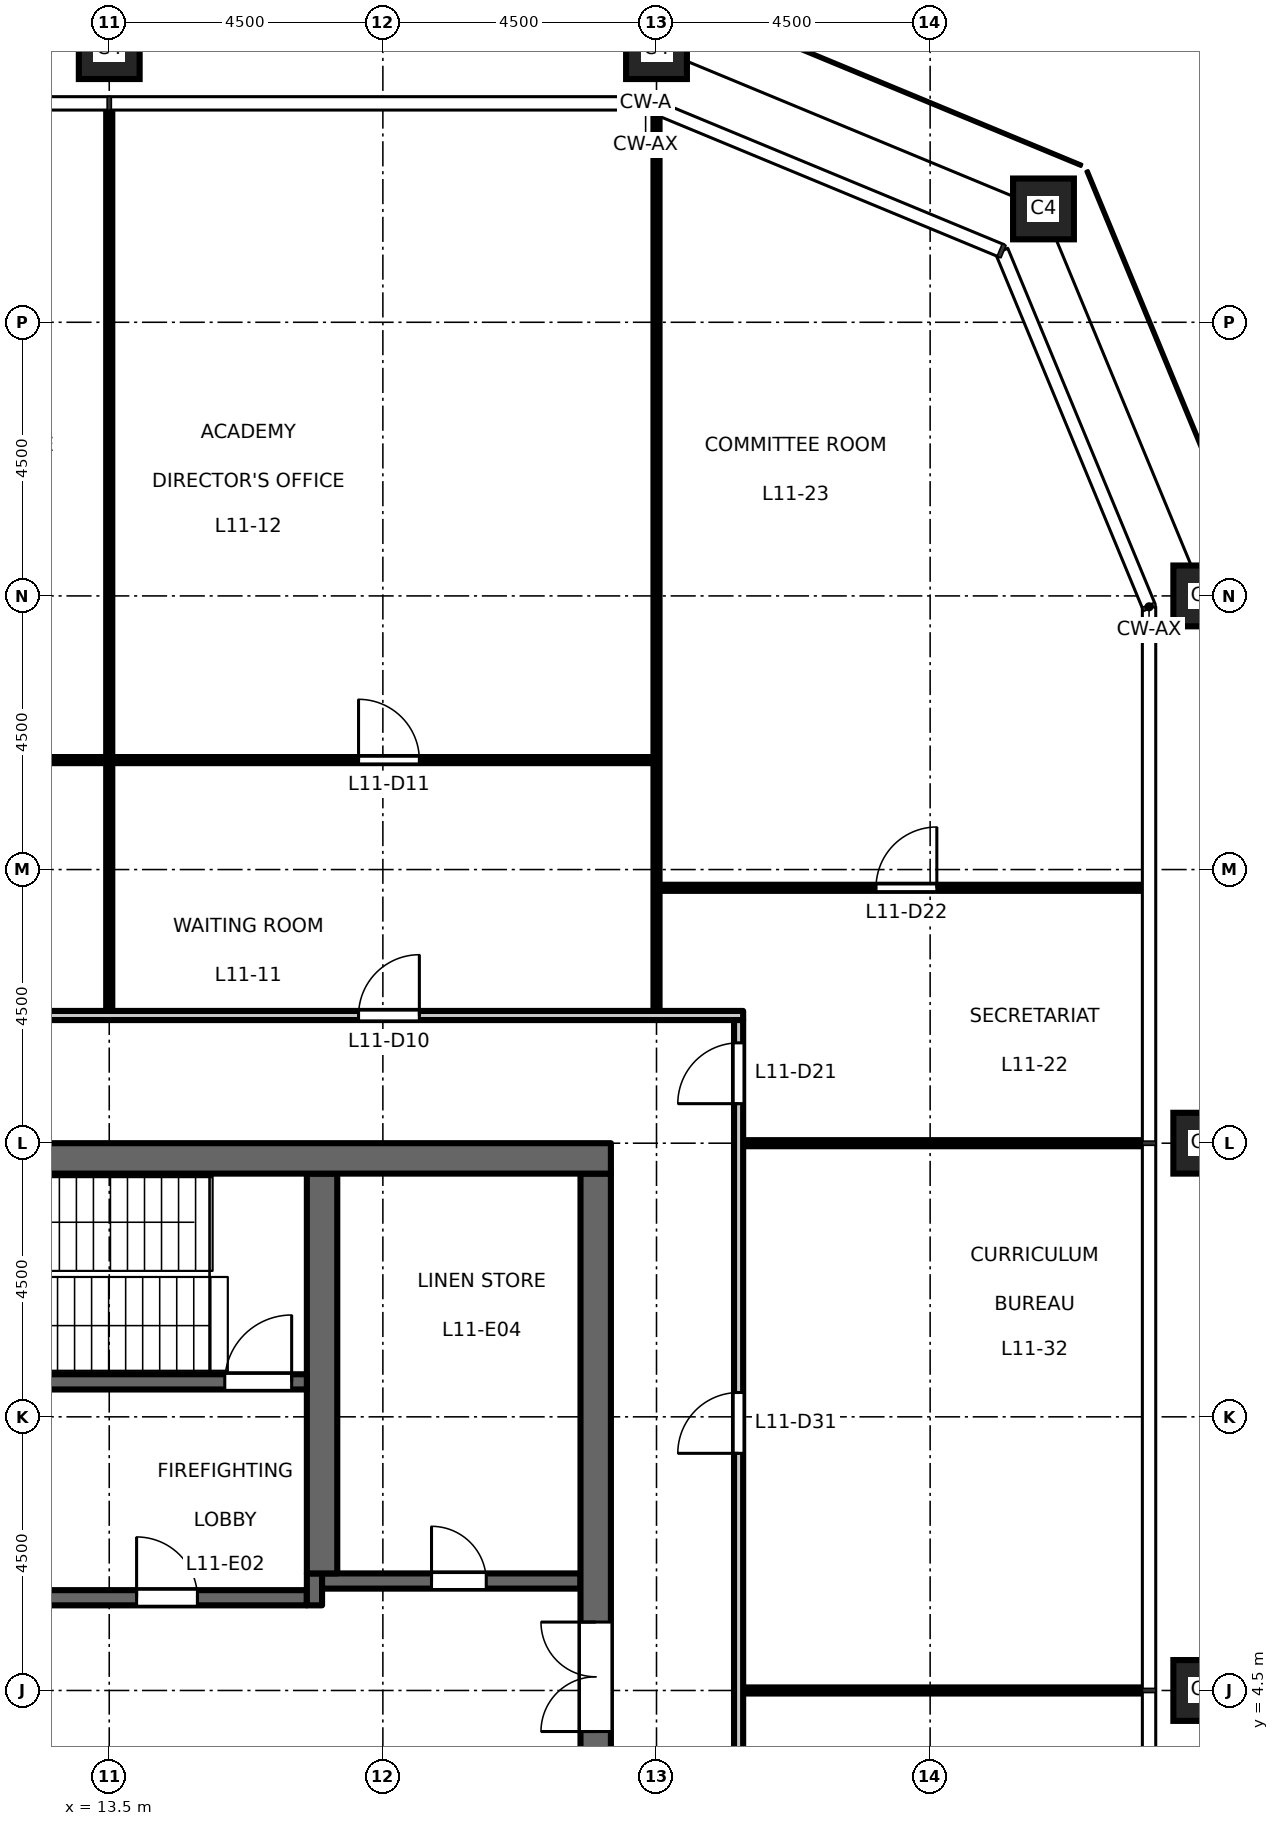
"""IFC4 building model, lengths in metres.
Left out: names, types, materials, properties, quantities, classifications, styles, units other than length and angle.
Written with IfcOpenShell. Run it as: python <this file> out.ifc"""

import sys

from ifc_helpers import new_model, si_unit, direction, frame, frame_2d, origin, origin_2d, place, context, subcontext, project, spatial, rectangle, hollow_rectangle, extrude, element, fill, save


model = new_model("IFC4")
c1 = context("Model", 3, precision=1e-05, world=origin(), true_north=direction((0.0, 1.0)))
c2 = subcontext(c1, "Body", "Model", "MODEL_VIEW")
j1 = project(units=[si_unit("LENGTHUNIT", "METRE"), si_unit("PLANEANGLEUNIT", "RADIAN")], contexts=[c1])
p1 = place(None, origin())
s1 = spatial("IfcSite", under=j1, at=p1, CompositionType="ELEMENT")
p2 = place(p1, origin())
s2 = spatial("IfcBuilding", under=s1, at=p2, CompositionType="ELEMENT")
p3 = place(p2, frame((0.0, 0.0, 53.7)))
s3 = spatial("IfcBuildingStorey", under=s2, at=p3, CompositionType="ELEMENT", Elevation=53.7)
for number, where, z_axis, x_axis in (
    (1, (31.5, 4.5, 0.0), (0.0, 0.0, 1.0), (1.0, 0.0, 0.0)),
    (2, (31.5, 13.5, 0.0), (0.0, 0.0, 1.0), (1.0, 0.0, 0.0)),
    (3, (31.5, 22.5, 0.0), (0.0, 0.0, 1.0), (1.0, 0.0, 0.0)),
    (4, (28.864, 28.864, 0.0), (0.0, 0.0, 1.0), (1.0, 0.0, 0.0)),
    (5, (22.5, 31.5, 0.0), (0.0, 0.0, 1.0), (1.0, 0.0, 0.0)),
    (6, (13.5, 31.5, 0.0), (0.0, 0.0, 1.0), (1.0, 0.0, 0.0)),
):
    element("IfcColumn", number, at=place(p3, frame(where, z_axis=z_axis, x_axis=x_axis)), inside=s3, PredefinedType="COLUMN", context=c2, shape_type="SweptSolid", body=[
        extrude(hollow_rectangle(XDim=1.0, YDim=1.0, WallThickness=0.06, at=origin_2d()), origin(), (0.0, 0.0, 1.0), 4.5),
    ])
p4 = place(p3, frame((12.15, 6.025, 0.0), z_axis=(0.0, 0.0, 1.0), x_axis=(1.0, 0.0, 0.0)))
e7 = element("IfcWall", 7, at=p4, inside=s3, PredefinedType="SHEAR", context=c2, shape_type="SweptSolid", body=[
    extrude(rectangle(XDim=4.6, YDim=0.25, at=frame_2d((2.3, 0.0))), origin(), (0.0, 0.0, 1.0), 4.35),
])
p5 = place(p4, frame((1.8, 0.0, 0.0)))
e8 = element("IfcOpeningElement", 8, at=p5, cuts=e7, PredefinedType="OPENING", context=c2, shape_type="SweptSolid", body=[
    extrude(rectangle(XDim=1.0, YDim=2.1, at=frame_2d((0.5, 1.05))), frame((0.0, 0.135, 0.0), z_axis=(0.0, -1.0, 0.0), x_axis=(1.0, 0.0, 0.0)), (0.0, 0.0, 1.0), 0.27),
])
p6 = place(p3, frame((16.875, 5.9, 0.0), z_axis=(0.0, 0.0, 1.0), x_axis=(0.0, 1.0, 0.0)))
e9 = element("IfcWall", 9, at=p6, inside=s3, PredefinedType="SHEAR", context=c2, shape_type="SweptSolid", body=[
    extrude(rectangle(XDim=0.525, YDim=0.25, at=frame_2d((0.263, 0.0))), origin(), (0.0, 0.0, 1.0), 4.35),
])
p7 = place(p3, frame((17.0, 6.3, 0.0), z_axis=(0.0, 0.0, 1.0), x_axis=(1.0, 0.0, 0.0)))
e10 = element("IfcWall", 10, at=p7, inside=s3, PredefinedType="SHEAR", context=c2, shape_type="SweptSolid", body=[
    extrude(rectangle(XDim=4.25, YDim=0.25, at=frame_2d((2.125, 0.0))), origin(), (0.0, 0.0, 1.0), 4.35),
])
p8 = place(p7, frame((1.8, 0.0, 0.0)))
e11 = element("IfcOpeningElement", 11, at=p8, cuts=e10, PredefinedType="OPENING", context=c2, shape_type="SweptSolid", body=[
    extrude(rectangle(XDim=0.9, YDim=2.1, at=frame_2d((0.45, 1.05))), frame((0.0, 0.135, 0.0), z_axis=(0.0, -1.0, 0.0), x_axis=(1.0, 0.0, 0.0)), (0.0, 0.0, 1.0), 0.27),
])
p9 = place(p3, frame((21.5, -13.0, 0.0), z_axis=(0.0, 0.0, 1.0), x_axis=(0.0, 1.0, 0.0)))
e12 = element("IfcWall", 12, at=p9, inside=s3, PredefinedType="SHEAR", context=c2, shape_type="SweptSolid", body=[
    extrude(rectangle(XDim=26.0, YDim=0.5, at=frame_2d((13.0, 0.0))), origin(), (0.0, 0.0, 1.0), 4.35),
])
p10 = place(p9, frame((16.825, 0.0, 0.0)))
e13 = element("IfcOpeningElement", 13, at=p10, cuts=e12, PredefinedType="OPENING", context=c2, shape_type="SweptSolid", body=[
    extrude(rectangle(XDim=1.8, YDim=2.1, at=frame_2d((0.9, 1.05))), frame((0.0, 0.26, 0.0), z_axis=(0.0, -1.0, 0.0), x_axis=(1.0, 0.0, 0.0)), (0.0, 0.0, 1.0), 0.52),
])
p11 = place(p9, frame((7.375, 0.0, 0.0)))
e14 = element("IfcOpeningElement", 14, at=p11, cuts=e12, PredefinedType="OPENING", context=c2, shape_type="SweptSolid", body=[
    extrude(rectangle(XDim=1.8, YDim=2.1, at=frame_2d((0.9, 1.05))), frame((0.0, 0.26, 0.0), z_axis=(0.0, -1.0, 0.0), x_axis=(1.0, 0.0, 0.0)), (0.0, 0.0, 1.0), 0.52),
])
p12 = place(p9, frame((2.65, 0.0, 0.0)))
e15 = element("IfcOpeningElement", 15, at=p12, cuts=e12, PredefinedType="OPENING", context=c2, shape_type="SweptSolid", body=[
    extrude(rectangle(XDim=0.9, YDim=2.1, at=frame_2d((0.45, 1.05))), frame((0.0, 0.26, 0.0), z_axis=(0.0, -1.0, 0.0), x_axis=(1.0, 0.0, 0.0)), (0.0, 0.0, 1.0), 0.52),
])
p13 = place(p3, frame((17.0, 6.425, 0.0), z_axis=(0.0, 0.0, 1.0), x_axis=(0.0, 1.0, 0.0)))
e16 = element("IfcWall", 16, at=p13, inside=s3, PredefinedType="SHEAR", context=c2, shape_type="SweptSolid", body=[
    extrude(rectangle(XDim=6.575, YDim=0.5, at=frame_2d((3.288, 0.0))), origin(), (0.0, 0.0, 1.0), 4.35),
])
p14 = place(p3, frame((8.75, 9.575, 0.0), z_axis=(0.0, 0.0, 1.0), x_axis=(1.0, 0.0, 0.0)))
e17 = element("IfcWall", 17, at=p14, inside=s3, PredefinedType="SHEAR", context=c2, shape_type="SweptSolid", body=[
    extrude(rectangle(XDim=8.0, YDim=0.25, at=frame_2d((4.0, 0.0))), origin(), (0.0, 0.0, 1.0), 4.35),
])
p15 = place(p14, frame((6.65, 0.0, 0.0)))
e18 = element("IfcOpeningElement", 18, at=p15, cuts=e17, PredefinedType="OPENING", context=c2, shape_type="SweptSolid", body=[
    extrude(rectangle(XDim=1.1, YDim=2.1, at=frame_2d((0.55, 1.05))), frame((0.0, 0.135, 0.0), z_axis=(0.0, -1.0, 0.0), x_axis=(1.0, 0.0, 0.0)), (0.0, 0.0, 1.0), 0.27),
])
p16 = place(p3, frame((8.25, 13.25, 0.0), z_axis=(0.0, 0.0, 1.0), x_axis=(1.0, 0.0, 0.0)))
e19 = element("IfcWall", 19, at=p16, inside=s3, PredefinedType="SHEAR", context=c2, shape_type="SweptSolid", body=[
    extrude(rectangle(XDim=13.5, YDim=0.5, at=frame_2d((6.75, 0.0))), origin(), (0.0, 0.0, 1.0), 4.35),
])
p17 = place(p3, frame((23.925, 4.5, 0.0), z_axis=(0.0, 0.0, 1.0), x_axis=(1.0, 0.0, 0.0)))
e20 = element("IfcWall", 20, at=p17, inside=s3, PredefinedType="PARTITIONING", context=c2, shape_type="SweptSolid", body=[
    extrude(rectangle(XDim=6.585, YDim=0.1, at=frame_2d((3.292, 0.0))), origin(), (0.0, 0.0, 1.0), 4.35),
])
p18 = place(p3, frame((23.925, 13.5, 0.0), z_axis=(0.0, 0.0, 1.0), x_axis=(1.0, 0.0, 0.0)))
e21 = element("IfcWall", 21, at=p18, inside=s3, PredefinedType="PARTITIONING", context=c2, shape_type="SweptSolid", body=[
    extrude(rectangle(XDim=6.585, YDim=0.1, at=frame_2d((3.292, 0.0))), origin(), (0.0, 0.0, 1.0), 3.35),
])
p19 = place(p3, frame((-23.925, 15.6, 0.0), z_axis=(0.0, 0.0, 1.0), x_axis=(1.0, 0.0, 0.0)))
e22 = element("IfcWall", 22, at=p19, inside=s3, PredefinedType="PARTITIONING", context=c2, shape_type="SweptSolid", body=[
    extrude(rectangle(XDim=47.85, YDim=0.15, at=frame_2d((23.925, 0.0))), origin(), (0.0, 0.0, 1.0), 4.35),
])
p20 = place(p19, frame((5.525, 0.0, 0.0)))
e23 = element("IfcOpeningElement", 23, at=p20, cuts=e22, PredefinedType="OPENING", context=c2, shape_type="SweptSolid", body=[
    extrude(rectangle(XDim=1.0, YDim=2.1, at=frame_2d((0.5, 1.05))), frame((0.0, 0.085, 0.0), z_axis=(0.0, -1.0, 0.0), x_axis=(1.0, 0.0, 0.0)), (0.0, 0.0, 1.0), 0.17),
])
p21 = place(p19, frame((14.525, 0.0, 0.0)))
e24 = element("IfcOpeningElement", 24, at=p21, cuts=e22, PredefinedType="OPENING", context=c2, shape_type="SweptSolid", body=[
    extrude(rectangle(XDim=1.0, YDim=2.1, at=frame_2d((0.5, 1.05))), frame((0.0, 0.085, 0.0), z_axis=(0.0, -1.0, 0.0), x_axis=(1.0, 0.0, 0.0)), (0.0, 0.0, 1.0), 0.17),
])
p22 = place(p19, frame((23.525, 0.0, 0.0)))
e25 = element("IfcOpeningElement", 25, at=p22, cuts=e22, PredefinedType="OPENING", context=c2, shape_type="SweptSolid", body=[
    extrude(rectangle(XDim=1.0, YDim=2.1, at=frame_2d((0.5, 1.05))), frame((0.0, 0.085, 0.0), z_axis=(0.0, -1.0, 0.0), x_axis=(1.0, 0.0, 0.0)), (0.0, 0.0, 1.0), 0.17),
])
p23 = place(p19, frame((32.525, 0.0, 0.0)))
e26 = element("IfcOpeningElement", 26, at=p23, cuts=e22, PredefinedType="OPENING", context=c2, shape_type="SweptSolid", body=[
    extrude(rectangle(XDim=1.0, YDim=2.1, at=frame_2d((0.5, 1.05))), frame((0.0, 0.085, 0.0), z_axis=(0.0, -1.0, 0.0), x_axis=(1.0, 0.0, 0.0)), (0.0, 0.0, 1.0), 0.17),
])
p24 = place(p19, frame((41.525, 0.0, 0.0)))
e27 = element("IfcOpeningElement", 27, at=p24, cuts=e22, PredefinedType="OPENING", context=c2, shape_type="SweptSolid", body=[
    extrude(rectangle(XDim=1.0, YDim=2.1, at=frame_2d((0.5, 1.05))), frame((0.0, 0.085, 0.0), z_axis=(0.0, -1.0, 0.0), x_axis=(1.0, 0.0, 0.0)), (0.0, 0.0, 1.0), 0.17),
])
p25 = place(p3, frame((22.55, 17.7, 0.0), z_axis=(0.0, 0.0, 1.0), x_axis=(1.0, 0.0, 0.0)))
e28 = element("IfcWall", 28, at=p25, inside=s3, PredefinedType="PARTITIONING", context=c2, shape_type="SweptSolid", body=[
    extrude(rectangle(XDim=7.96, YDim=0.1, at=frame_2d((3.98, 0.0))), origin(), (0.0, 0.0, 1.0), 4.35),
])
p26 = place(p25, frame((3.56, 0.0, 0.0)))
e29 = element("IfcOpeningElement", 29, at=p26, cuts=e28, PredefinedType="OPENING", context=c2, shape_type="SweptSolid", body=[
    extrude(rectangle(XDim=1.0, YDim=2.1, at=frame_2d((0.5, 1.05))), frame((0.0, 0.06, 0.0), z_axis=(0.0, -1.0, 0.0), x_axis=(1.0, 0.0, 0.0)), (0.0, 0.0, 1.0), 0.12),
])
p27 = place(p3, frame((-4.45, 19.8, 0.0), z_axis=(0.0, 0.0, 1.0), x_axis=(1.0, 0.0, 0.0)))
e30 = element("IfcWall", 30, at=p27, inside=s3, PredefinedType="PARTITIONING", context=c2, shape_type="SweptSolid", body=[
    extrude(rectangle(XDim=26.9, YDim=0.1, at=frame_2d((13.45, 0.0))), origin(), (0.0, 0.0, 1.0), 4.35),
])
p28 = place(p27, frame((4.05, 0.0, 0.0)))
e31 = element("IfcOpeningElement", 31, at=p28, cuts=e30, PredefinedType="OPENING", context=c2, shape_type="SweptSolid", body=[
    extrude(rectangle(XDim=1.0, YDim=2.1, at=frame_2d((0.5, 1.05))), frame((0.0, 0.06, 0.0), z_axis=(0.0, -1.0, 0.0), x_axis=(1.0, 0.0, 0.0)), (0.0, 0.0, 1.0), 0.12),
])
p29 = place(p27, frame((13.05, 0.0, 0.0)))
e32 = element("IfcOpeningElement", 32, at=p29, cuts=e30, PredefinedType="OPENING", context=c2, shape_type="SweptSolid", body=[
    extrude(rectangle(XDim=1.0, YDim=2.1, at=frame_2d((0.5, 1.05))), frame((0.0, 0.06, 0.0), z_axis=(0.0, -1.0, 0.0), x_axis=(1.0, 0.0, 0.0)), (0.0, 0.0, 1.0), 0.12),
])
p30 = place(p27, frame((22.05, 0.0, 0.0)))
e33 = element("IfcOpeningElement", 33, at=p30, cuts=e30, PredefinedType="OPENING", context=c2, shape_type="SweptSolid", body=[
    extrude(rectangle(XDim=1.0, YDim=2.1, at=frame_2d((0.5, 1.05))), frame((0.0, 0.06, 0.0), z_axis=(0.0, -1.0, 0.0), x_axis=(1.0, 0.0, 0.0)), (0.0, 0.0, 1.0), 0.12),
])
p31 = place(p3, frame((13.5, 15.675, 0.0), z_axis=(0.0, 0.0, 1.0), x_axis=(0.0, 1.0, 0.0)))
e34 = element("IfcWall", 34, at=p31, inside=s3, PredefinedType="PARTITIONING", context=c2, shape_type="SweptSolid", body=[
    extrude(rectangle(XDim=4.075, YDim=0.1, at=frame_2d((2.038, 0.0))), origin(), (0.0, 0.0, 1.0), 3.35),
])
p32 = place(p3, frame((13.5, 19.85, 0.0), z_axis=(0.0, 0.0, 1.0), x_axis=(0.0, 1.0, 0.0)))
e35 = element("IfcWall", 35, at=p32, inside=s3, PredefinedType="PARTITIONING", context=c2, shape_type="SweptSolid", body=[
    extrude(rectangle(XDim=10.66, YDim=0.1, at=frame_2d((5.33, 0.0))), origin(), (0.0, 0.0, 1.0), 3.35),
])
p33 = place(p3, frame((22.5, 15.675, 0.0), z_axis=(0.0, 0.0, 1.0), x_axis=(0.0, 1.0, 0.0)))
e36 = element("IfcWall", 36, at=p33, inside=s3, PredefinedType="PARTITIONING", context=c2, shape_type="SweptSolid", body=[
    extrude(rectangle(XDim=14.753, YDim=0.1, at=frame_2d((7.376, 0.0))), origin(), (0.0, 0.0, 1.0), 3.35),
])
p34 = place(p3, frame((23.85, -15.525, 0.0), z_axis=(0.0, 0.0, 1.0), x_axis=(0.0, 1.0, 0.0)))
e37 = element("IfcWall", 37, at=p34, inside=s3, PredefinedType="PARTITIONING", context=c2, shape_type="SweptSolid", body=[
    extrude(rectangle(XDim=31.05, YDim=0.15, at=frame_2d((15.525, 0.0))), origin(), (0.0, 0.0, 1.0), 4.35),
])
p35 = place(p34, frame((29.675, 0.0, 0.0)))
e38 = element("IfcOpeningElement", 38, at=p35, cuts=e37, PredefinedType="OPENING", context=c2, shape_type="SweptSolid", body=[
    extrude(rectangle(XDim=1.0, YDim=2.1, at=frame_2d((0.5, 1.05))), frame((0.0, 0.085, 0.0), z_axis=(0.0, -1.0, 0.0), x_axis=(1.0, 0.0, 0.0)), (0.0, 0.0, 1.0), 0.17),
])
p36 = place(p34, frame((0.575, 0.0, 0.0)))
e39 = element("IfcOpeningElement", 39, at=p36, cuts=e37, PredefinedType="OPENING", context=c2, shape_type="SweptSolid", body=[
    extrude(rectangle(XDim=1.0, YDim=2.1, at=frame_2d((0.5, 1.05))), frame((0.0, 0.085, 0.0), z_axis=(0.0, -1.0, 0.0), x_axis=(1.0, 0.0, 0.0)), (0.0, 0.0, 1.0), 0.17),
])
p37 = place(p34, frame((5.925, 0.0, 0.0)))
e40 = element("IfcOpeningElement", 40, at=p37, cuts=e37, PredefinedType="OPENING", context=c2, shape_type="SweptSolid", body=[
    extrude(rectangle(XDim=1.0, YDim=2.1, at=frame_2d((0.5, 1.05))), frame((0.0, 0.085, 0.0), z_axis=(0.0, -1.0, 0.0), x_axis=(1.0, 0.0, 0.0)), (0.0, 0.0, 1.0), 0.17),
])
p38 = place(p34, frame((14.925, 0.0, 0.0)))
e41 = element("IfcOpeningElement", 41, at=p38, cuts=e37, PredefinedType="OPENING", context=c2, shape_type="SweptSolid", body=[
    extrude(rectangle(XDim=1.0, YDim=2.1, at=frame_2d((0.5, 1.05))), frame((0.0, 0.085, 0.0), z_axis=(0.0, -1.0, 0.0), x_axis=(1.0, 0.0, 0.0)), (0.0, 0.0, 1.0), 0.17),
])
p39 = place(p34, frame((23.925, 0.0, 0.0)))
e42 = element("IfcOpeningElement", 42, at=p39, cuts=e37, PredefinedType="OPENING", context=c2, shape_type="SweptSolid", body=[
    extrude(rectangle(XDim=1.0, YDim=2.1, at=frame_2d((0.5, 1.05))), frame((0.0, 0.085, 0.0), z_axis=(0.0, -1.0, 0.0), x_axis=(1.0, 0.0, 0.0)), (0.0, 0.0, 1.0), 0.17),
])
p40 = place(p5, origin())
e43 = element("IfcDoor", 43, at=p40, inside=s3, OperationType="SINGLE_SWING_RIGHT", PredefinedType="DOOR", context=c2, shape_type="SweptSolid", body=[
    extrude(rectangle(XDim=1.0, YDim=2.1, at=frame_2d((0.5, 1.05))), frame((0.0, 0.025, 0.0), z_axis=(0.0, -1.0, 0.0), x_axis=(1.0, 0.0, 0.0)), (0.0, 0.0, 1.0), 0.05),
])
fill(e8, e43)
p41 = place(p15, origin())
e44 = element("IfcDoor", 44, at=p41, inside=s3, OperationType="SINGLE_SWING_LEFT", PredefinedType="DOOR", context=c2, shape_type="SweptSolid", body=[
    extrude(rectangle(XDim=1.1, YDim=2.1, at=frame_2d((0.55, 1.05))), frame((0.0, 0.025, 0.0), z_axis=(0.0, -1.0, 0.0), x_axis=(1.0, 0.0, 0.0)), (0.0, 0.0, 1.0), 0.05),
])
fill(e18, e44)
p42 = place(p10, origin())
e45 = element("IfcDoor", 45, at=p42, inside=s3, OperationType="DOUBLE_DOOR_DOUBLE_SWING", PredefinedType="DOOR", context=c2, shape_type="SweptSolid", body=[
    extrude(rectangle(XDim=1.8, YDim=2.1, at=frame_2d((0.9, 1.05))), frame((0.0, 0.025, 0.0), z_axis=(0.0, -1.0, 0.0), x_axis=(1.0, 0.0, 0.0)), (0.0, 0.0, 1.0), 0.05),
])
fill(e13, e45)
p43 = place(p8, origin())
e46 = element("IfcDoor", 46, at=p43, inside=s3, OperationType="SINGLE_SWING_RIGHT", PredefinedType="DOOR", context=c2, shape_type="SweptSolid", body=[
    extrude(rectangle(XDim=0.9, YDim=2.1, at=frame_2d((0.45, 1.05))), frame((0.0, 0.025, 0.0), z_axis=(0.0, -1.0, 0.0), x_axis=(1.0, 0.0, 0.0)), (0.0, 0.0, 1.0), 0.05),
])
fill(e11, e46)
p44 = place(p24, origin())
e47 = element("IfcDoor", 47, at=p44, inside=s3, OperationType="SINGLE_SWING_RIGHT", PredefinedType="DOOR", context=c2, shape_type="SweptSolid", body=[
    extrude(rectangle(XDim=1.0, YDim=2.1, at=frame_2d((0.5, 1.05))), frame((0.0, 0.025, 0.0), z_axis=(0.0, -1.0, 0.0), x_axis=(1.0, 0.0, 0.0)), (0.0, 0.0, 1.0), 0.05),
])
fill(e27, e47)
p45 = place(p30, origin())
e48 = element("IfcDoor", 48, at=p45, inside=s3, OperationType="SINGLE_SWING_LEFT", PredefinedType="DOOR", context=c2, shape_type="SweptSolid", body=[
    extrude(rectangle(XDim=1.0, YDim=2.1, at=frame_2d((0.5, 1.05))), frame((0.0, 0.025, 0.0), z_axis=(0.0, -1.0, 0.0), x_axis=(1.0, 0.0, 0.0)), (0.0, 0.0, 1.0), 0.05),
])
fill(e33, e48)
p46 = place(p35, origin())
e49 = element("IfcDoor", 49, at=p46, inside=s3, OperationType="SINGLE_SWING_LEFT", PredefinedType="DOOR", context=c2, shape_type="SweptSolid", body=[
    extrude(rectangle(XDim=1.0, YDim=2.1, at=frame_2d((0.5, 1.05))), frame((0.0, 0.025, 0.0), z_axis=(0.0, -1.0, 0.0), x_axis=(1.0, 0.0, 0.0)), (0.0, 0.0, 1.0), 0.05),
])
fill(e38, e49)
p47 = place(p26, origin())
e50 = element("IfcDoor", 50, at=p47, inside=s3, OperationType="SINGLE_SWING_RIGHT", PredefinedType="DOOR", context=c2, shape_type="SweptSolid", body=[
    extrude(rectangle(XDim=1.0, YDim=2.1, at=frame_2d((0.5, 1.05))), frame((0.0, 0.025, 0.0), z_axis=(0.0, -1.0, 0.0), x_axis=(1.0, 0.0, 0.0)), (0.0, 0.0, 1.0), 0.05),
])
fill(e29, e50)
p48 = place(p39, origin())
e51 = element("IfcDoor", 51, at=p48, inside=s3, OperationType="SINGLE_SWING_LEFT", PredefinedType="DOOR", context=c2, shape_type="SweptSolid", body=[
    extrude(rectangle(XDim=1.0, YDim=2.1, at=frame_2d((0.5, 1.05))), frame((0.0, 0.025, 0.0), z_axis=(0.0, -1.0, 0.0), x_axis=(1.0, 0.0, 0.0)), (0.0, 0.0, 1.0), 0.05),
])
fill(e42, e51)
save(model, sys.argv[1])
